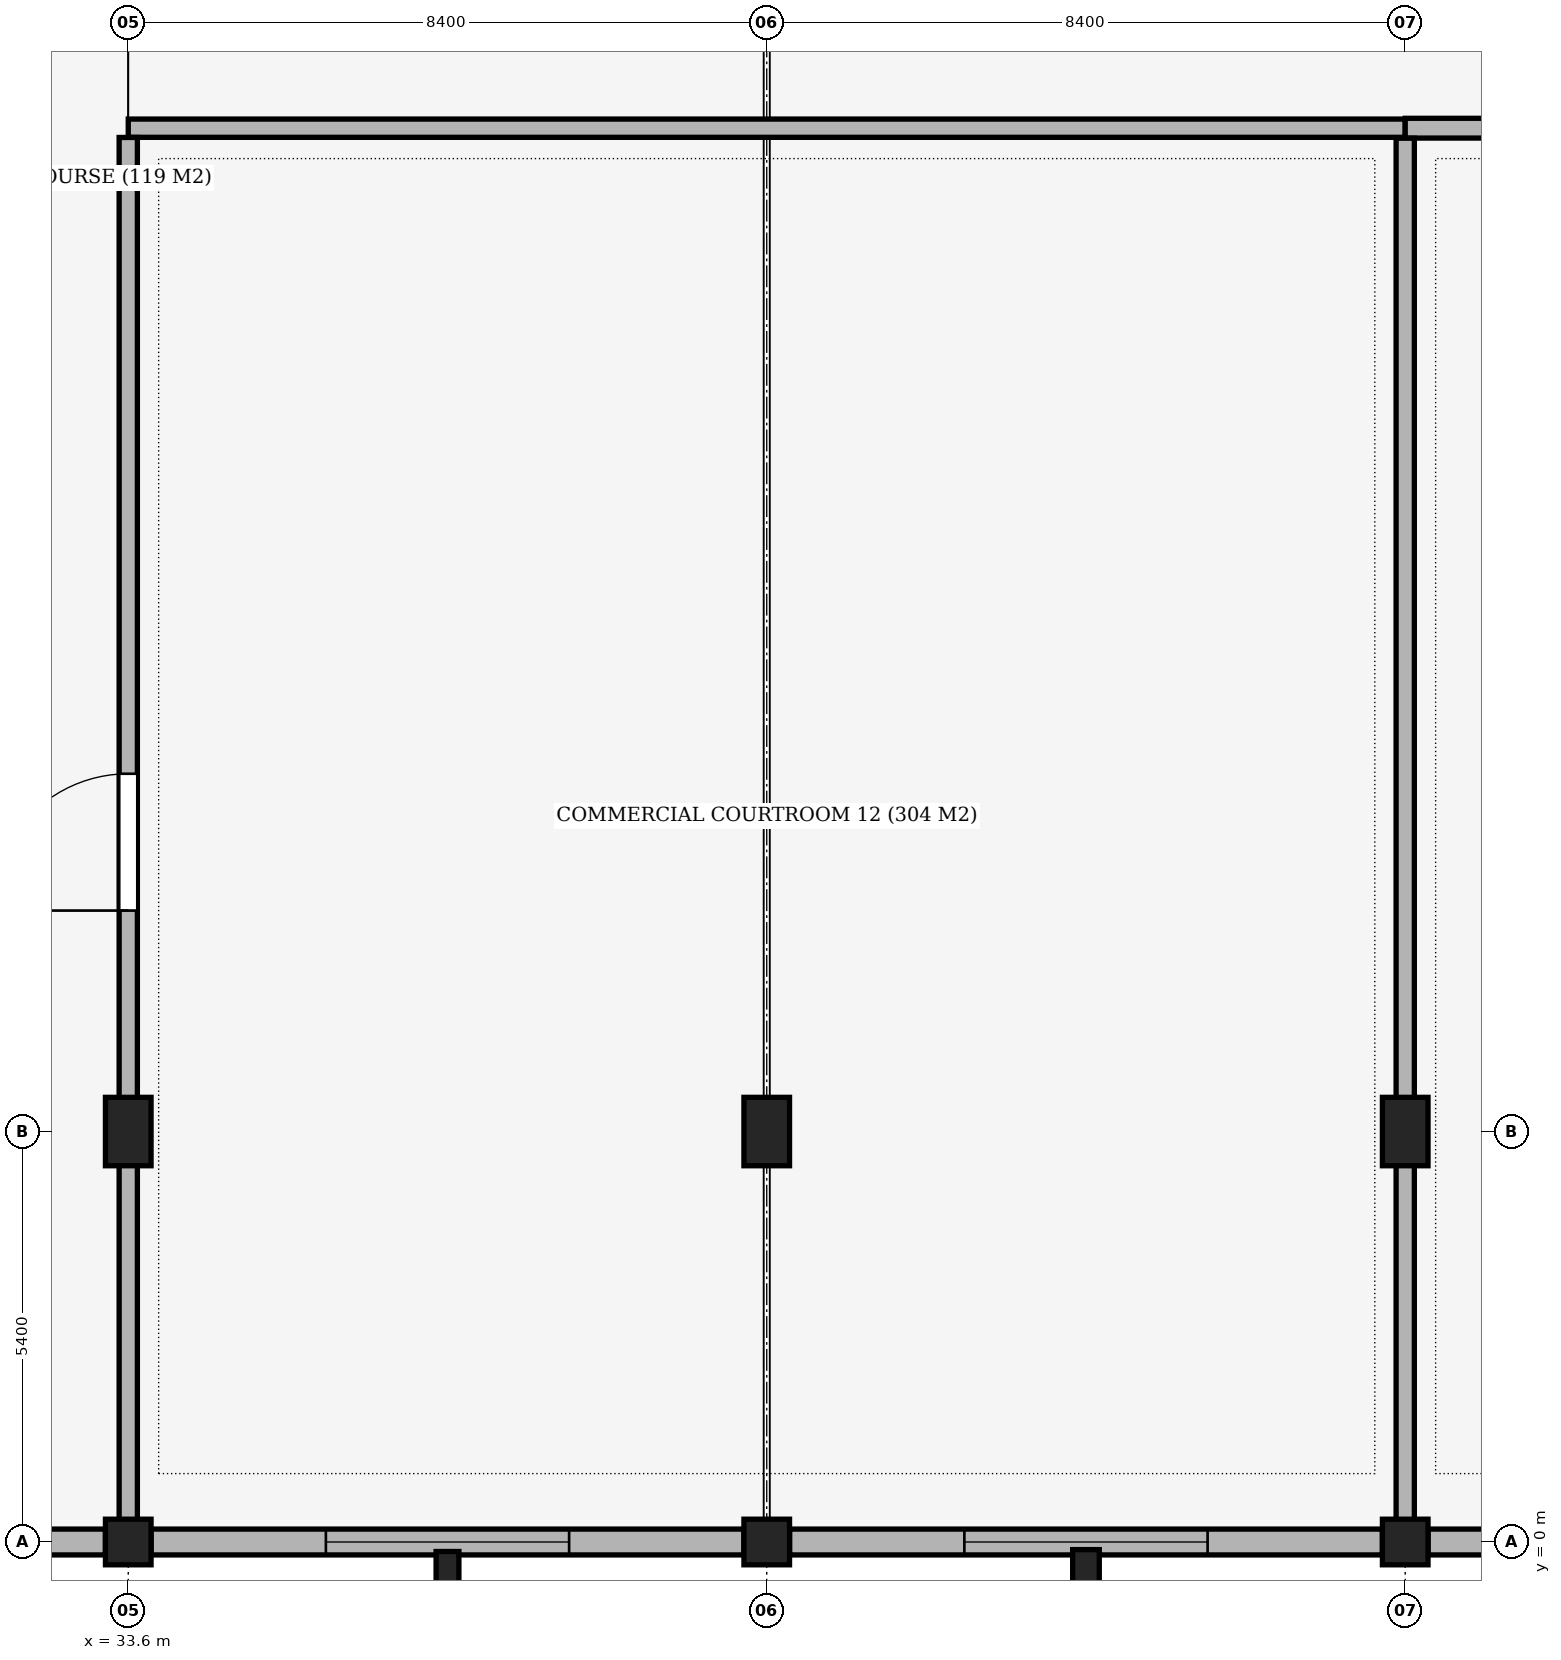
"""IFC4 building model, lengths in metres.
Left out: names, types, materials, properties, quantities, classifications, styles, units other than length and angle.
Written with IfcOpenShell. Run it as: python <this file> out.ifc"""

import sys

from ifc_helpers import new_model, si_unit, direction, frame, frame_2d, origin, origin_2d, place, context, subcontext, project, spatial, rectangle, extrude, element, fill, save


model = new_model("IFC4")
c1 = context("Model", 3, precision=1e-05, world=origin(), true_north=direction((0.0, 1.0)))
c2 = subcontext(c1, "Body", "Model", "MODEL_VIEW")
j1 = project(units=[si_unit("LENGTHUNIT", "METRE"), si_unit("PLANEANGLEUNIT", "RADIAN")], contexts=[c1])
p1 = place(None, origin())
s1 = spatial("IfcSite", under=j1, at=p1, CompositionType="ELEMENT")
p2 = place(p1, origin())
s2 = spatial("IfcBuilding", under=s1, at=p2, CompositionType="ELEMENT")
p3 = place(p2, frame((0.0, 0.0, 10.2)))
s3 = spatial("IfcBuildingStorey", under=s2, at=p3, CompositionType="ELEMENT", Elevation=10.2)
p4 = place(p3, frame((33.6, 0.0, 0.0), z_axis=(0.0, 0.0, 1.0), x_axis=(1.0, 0.0, 0.0)))
e1 = element("IfcColumn", 1, at=p4, inside=s3, PredefinedType="COLUMN", context=c2, shape_type="SweptSolid", body=[
    extrude(rectangle(XDim=0.6, YDim=0.6, at=origin_2d()), origin(), (0.0, 0.0, 1.0), 5.1),
])
p5 = place(p3, frame((33.6, 5.4, 0.0), z_axis=(0.0, 0.0, 1.0), x_axis=(1.0, 0.0, 0.0)))
e2 = element("IfcColumn", 2, at=p5, inside=s3, PredefinedType="COLUMN", context=c2, shape_type="SweptSolid", body=[
    extrude(rectangle(XDim=0.6, YDim=0.9, at=origin_2d()), origin(), (0.0, 0.0, 1.0), 5.1),
])
p6 = place(p3, frame((42.0, 0.0, 0.0), z_axis=(0.0, 0.0, 1.0), x_axis=(1.0, 0.0, 0.0)))
e3 = element("IfcColumn", 3, at=p6, inside=s3, PredefinedType="COLUMN", context=c2, shape_type="SweptSolid", body=[
    extrude(rectangle(XDim=0.6, YDim=0.6, at=origin_2d()), origin(), (0.0, 0.0, 1.0), 5.1),
])
p7 = place(p3, frame((42.0, 5.4, 0.0), z_axis=(0.0, 0.0, 1.0), x_axis=(1.0, 0.0, 0.0)))
e4 = element("IfcColumn", 4, at=p7, inside=s3, PredefinedType="COLUMN", context=c2, shape_type="SweptSolid", body=[
    extrude(rectangle(XDim=0.6, YDim=0.9, at=origin_2d()), origin(), (0.0, 0.0, 1.0), 5.1),
])
p8 = place(p3, frame((50.4, 0.0, 0.0), z_axis=(0.0, 0.0, 1.0), x_axis=(1.0, 0.0, 0.0)))
e5 = element("IfcColumn", 5, at=p8, inside=s3, PredefinedType="COLUMN", context=c2, shape_type="SweptSolid", body=[
    extrude(rectangle(XDim=0.6, YDim=0.6, at=origin_2d()), origin(), (0.0, 0.0, 1.0), 5.1),
])
p9 = place(p3, frame((50.4, 5.4, 0.0), z_axis=(0.0, 0.0, 1.0), x_axis=(1.0, 0.0, 0.0)))
e6 = element("IfcColumn", 6, at=p9, inside=s3, PredefinedType="COLUMN", context=c2, shape_type="SweptSolid", body=[
    extrude(rectangle(XDim=0.6, YDim=0.9, at=origin_2d()), origin(), (0.0, 0.0, 1.0), 5.1),
])
p10 = place(p3, frame((37.8, -0.35, 0.0), z_axis=(0.0, 0.0, 1.0), x_axis=(1.0, 0.0, 0.0)))
e7 = element("IfcColumn", 7, at=p10, inside=s3, PredefinedType="PILASTER", context=c2, shape_type="SweptSolid", body=[
    extrude(rectangle(XDim=0.3, YDim=0.45, at=origin_2d()), origin(), (0.0, 0.0, 1.0), 5.1),
])
p11 = place(p3, frame((46.2, -0.35, 0.0), z_axis=(0.0, 0.0, 1.0), x_axis=(1.0, 0.0, 0.0)))
e8 = element("IfcColumn", 8, at=p11, inside=s3, PredefinedType="PILASTER", context=c2, shape_type="SweptSolid", body=[
    extrude(rectangle(XDim=0.35, YDim=0.5, at=origin_2d()), origin(), (0.0, 0.0, 1.0), 5.1),
])
p12 = place(p3, frame((58.5, 0.0, 0.0), z_axis=(0.0, 0.0, 1.0), x_axis=(-1.0, 0.0, 0.0)))
e9 = element("IfcWall", 9, at=p12, inside=s3, PredefinedType="SOLIDWALL", context=c2, shape_type="SweptSolid", body=[
    extrude(rectangle(XDim=7.8, YDim=0.34, at=frame_2d((3.9, 0.0))), origin(), (0.0, 0.0, 1.0), 4.12),
])
p13 = place(p12, frame((2.3, 0.0, 0.75)))
e10 = element("IfcOpeningElement", 10, at=p13, cuts=e9, PredefinedType="OPENING", context=c2, shape_type="SweptSolid", body=[
    extrude(rectangle(XDim=3.2, YDim=2.6, at=frame_2d((1.6, 1.3))), frame((0.0, 0.185, 0.0), z_axis=(0.0, -1.0, 0.0), x_axis=(1.0, 0.0, 0.0)), (0.0, 0.0, 1.0), 0.37),
])
p14 = place(p3, frame((50.1, 0.0, 0.0), z_axis=(0.0, 0.0, 1.0), x_axis=(-1.0, 0.0, 0.0)))
e11 = element("IfcWall", 11, at=p14, inside=s3, PredefinedType="SOLIDWALL", context=c2, shape_type="SweptSolid", body=[
    extrude(rectangle(XDim=7.8, YDim=0.34, at=frame_2d((3.9, 0.0))), origin(), (0.0, 0.0, 1.0), 4.12),
])
p15 = place(p14, frame((2.3, 0.0, 0.75)))
e12 = element("IfcOpeningElement", 12, at=p15, cuts=e11, PredefinedType="OPENING", context=c2, shape_type="SweptSolid", body=[
    extrude(rectangle(XDim=3.2, YDim=2.6, at=frame_2d((1.6, 1.3))), frame((0.0, 0.185, 0.0), z_axis=(0.0, -1.0, 0.0), x_axis=(1.0, 0.0, 0.0)), (0.0, 0.0, 1.0), 0.37),
])
p16 = place(p3, frame((41.7, 0.0, 0.0), z_axis=(0.0, 0.0, 1.0), x_axis=(-1.0, 0.0, 0.0)))
e13 = element("IfcWall", 13, at=p16, inside=s3, PredefinedType="SOLIDWALL", context=c2, shape_type="SweptSolid", body=[
    extrude(rectangle(XDim=7.8, YDim=0.34, at=frame_2d((3.9, 0.0))), origin(), (0.0, 0.0, 1.0), 4.12),
])
p17 = place(p16, frame((2.3, 0.0, 0.75)))
e14 = element("IfcOpeningElement", 14, at=p17, cuts=e13, PredefinedType="OPENING", context=c2, shape_type="SweptSolid", body=[
    extrude(rectangle(XDim=3.2, YDim=2.6, at=frame_2d((1.6, 1.3))), frame((0.0, 0.185, 0.0), z_axis=(0.0, -1.0, 0.0), x_axis=(1.0, 0.0, 0.0)), (0.0, 0.0, 1.0), 0.37),
])
p18 = place(p3, frame((33.3, 0.0, 0.0), z_axis=(0.0, 0.0, 1.0), x_axis=(-1.0, 0.0, 0.0)))
e15 = element("IfcWall", 15, at=p18, inside=s3, PredefinedType="SOLIDWALL", context=c2, shape_type="SweptSolid", body=[
    extrude(rectangle(XDim=7.8, YDim=0.34, at=frame_2d((3.9, 0.0))), origin(), (0.0, 0.0, 1.0), 4.12),
])
p19 = place(p18, frame((4.267, 0.0, 0.75)))
e16 = element("IfcOpeningElement", 16, at=p19, cuts=e15, PredefinedType="OPENING", context=c2, shape_type="SweptSolid", body=[
    extrude(rectangle(XDim=2.8, YDim=2.6, at=frame_2d((1.4, 1.3))), frame((0.0, 0.185, 0.0), z_axis=(0.0, -1.0, 0.0), x_axis=(1.0, 0.0, 0.0)), (0.0, 0.0, 1.0), 0.37),
])
p20 = place(p3, frame((33.6, 18.6, 0.0), z_axis=(0.0, 0.0, 1.0), x_axis=(1.0, 0.0, 0.0)))
e17 = element("IfcWall", 17, at=p20, inside=s3, PredefinedType="PARTITIONING", context=c2, shape_type="SweptSolid", body=[
    extrude(rectangle(XDim=16.8, YDim=0.24, at=frame_2d((8.4, 0.0))), origin(), (0.0, 0.0, 1.0), 3.77),
])
p21 = place(p3, frame((50.4, 18.6, 0.0), z_axis=(0.0, 0.0, 1.0), x_axis=(1.0, 0.0, 0.0)))
e18 = element("IfcWall", 18, at=p21, inside=s3, PredefinedType="PARTITIONING", context=c2, shape_type="SweptSolid", body=[
    extrude(rectangle(XDim=16.8, YDim=0.26, at=frame_2d((8.4, 0.0))), origin(), (0.0, 0.0, 1.0), 3.77),
])
p22 = place(p21, frame((7.5, 0.0, 0.0)))
e19 = element("IfcOpeningElement", 19, at=p22, cuts=e18, PredefinedType="OPENING", context=c2, shape_type="SweptSolid", body=[
    extrude(rectangle(XDim=1.8, YDim=2.4, at=frame_2d((0.9, 1.2))), frame((0.0, 0.145, 0.0), z_axis=(0.0, -1.0, 0.0), x_axis=(1.0, 0.0, 0.0)), (0.0, 0.0, 1.0), 0.29),
])
p23 = place(p3, frame((33.6, -0.064, 0.0), z_axis=(0.0, 0.0, 1.0), x_axis=(0.0, 1.0, 0.0)))
e20 = element("IfcWall", 20, at=p23, inside=s3, PredefinedType="PARTITIONING", context=c2, shape_type="SweptSolid", body=[
    extrude(rectangle(XDim=18.542, YDim=0.24, at=frame_2d((9.271, 0.0))), origin(), (0.0, 0.0, 1.0), 3.77),
])
p24 = place(p23, frame((8.371, 0.0, 0.0)))
e21 = element("IfcOpeningElement", 21, at=p24, cuts=e20, PredefinedType="OPENING", context=c2, shape_type="SweptSolid", body=[
    extrude(rectangle(XDim=1.8, YDim=2.4, at=frame_2d((0.9, 1.2))), frame((0.0, 0.135, 0.0), z_axis=(0.0, -1.0, 0.0), x_axis=(1.0, 0.0, 0.0)), (0.0, 0.0, 1.0), 0.27),
])
p25 = place(p3, frame((50.4, -0.064, 0.0), z_axis=(0.0, 0.0, 1.0), x_axis=(0.0, 1.0, 0.0)))
e22 = element("IfcWall", 22, at=p25, inside=s3, PredefinedType="PARTITIONING", context=c2, shape_type="SweptSolid", body=[
    extrude(rectangle(XDim=18.532, YDim=0.24, at=frame_2d((9.266, 0.0))), origin(), (0.0, 0.0, 1.0), 3.77),
])
p26 = place(p15, origin())
e23 = element("IfcWindow", 23, at=p26, inside=s3, PartitioningType="SINGLE_PANEL", PredefinedType="WINDOW", context=c2, shape_type="SweptSolid", body=[
    extrude(rectangle(XDim=3.2, YDim=2.6, at=frame_2d((1.6, 1.3))), frame((0.0, 0.03, 0.0), z_axis=(0.0, -1.0, 0.0), x_axis=(1.0, 0.0, 0.0)), (0.0, 0.0, 1.0), 0.06),
])
fill(e12, e23)
p27 = place(p17, origin())
e24 = element("IfcWindow", 24, at=p27, inside=s3, PartitioningType="SINGLE_PANEL", PredefinedType="WINDOW", context=c2, shape_type="SweptSolid", body=[
    extrude(rectangle(XDim=3.2, YDim=2.6, at=frame_2d((1.6, 1.3))), frame((0.0, 0.03, 0.0), z_axis=(0.0, -1.0, 0.0), x_axis=(1.0, 0.0, 0.0)), (0.0, 0.0, 1.0), 0.06),
])
fill(e14, e24)
p28 = place(p24, origin())
e25 = element("IfcDoor", 25, at=p28, inside=s3, OperationType="SINGLE_SWING_LEFT", PredefinedType="DOOR", context=c2, shape_type="SweptSolid", body=[
    extrude(rectangle(XDim=1.8, YDim=2.4, at=frame_2d((0.9, 1.2))), frame((0.0, 0.025, 0.0), z_axis=(0.0, -1.0, 0.0), x_axis=(1.0, 0.0, 0.0)), (0.0, 0.0, 1.0), 0.05),
])
fill(e21, e25)
save(model, sys.argv[1])
